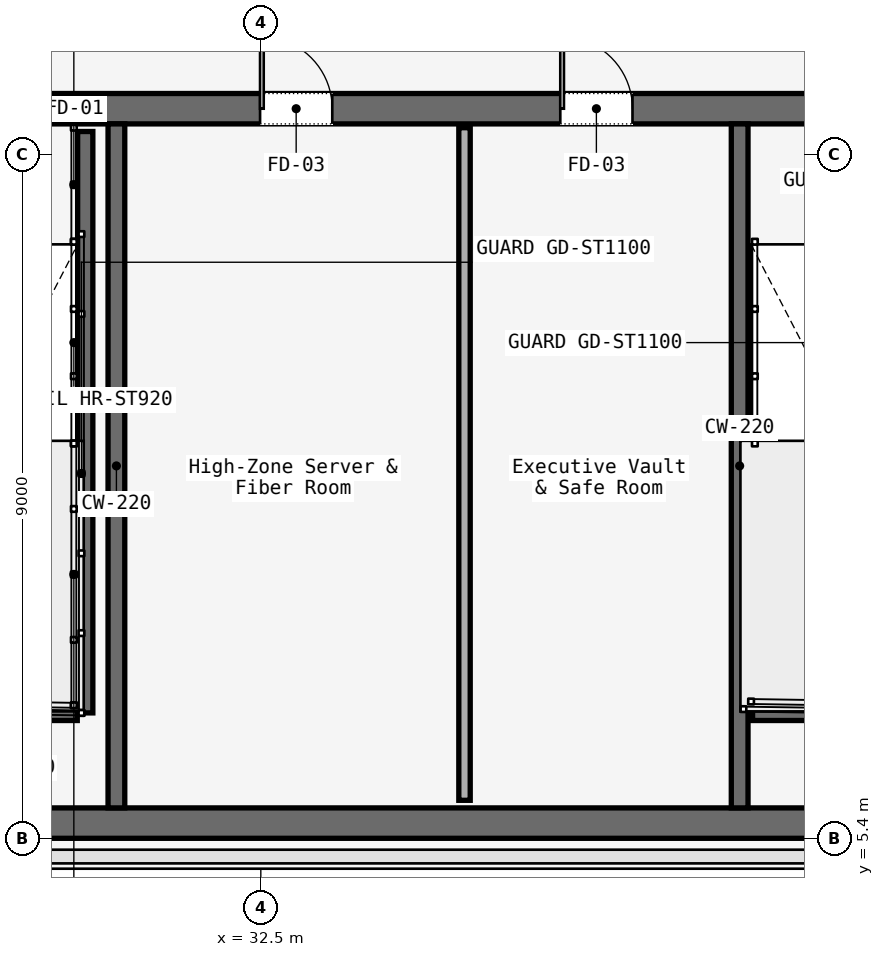
"""IFC4 building model, lengths in metres.
Left out: names, types, materials, properties, quantities, classifications, styles, units other than length and angle.
Written with IfcOpenShell. Run it as: python <this file> out.ifc"""

import sys

from ifc_helpers import new_model, si_unit, direction, frame, frame_2d, origin, place, context, subcontext, project, spatial, rectangle, extrude, element, fill, save


model = new_model("IFC4")
c1 = context("Model", 3, precision=1e-05, world=origin(), true_north=direction((0.0, 1.0)))
c2 = subcontext(c1, "Body", "Model", "MODEL_VIEW")
j1 = project(units=[si_unit("LENGTHUNIT", "METRE"), si_unit("PLANEANGLEUNIT", "RADIAN")], contexts=[c1])
p1 = place(None, origin())
s1 = spatial("IfcSite", under=j1, at=p1, CompositionType="ELEMENT")
p2 = place(p1, origin())
s2 = spatial("IfcBuilding", under=s1, at=p2, CompositionType="ELEMENT")
p3 = place(p2, frame((0.0, 0.0, 271.2)))
s3 = spatial("IfcBuildingStorey", under=s2, at=p3, CompositionType="ELEMENT", Elevation=271.2)
p4 = place(p3, frame((26.45, 15.0, 0.0), z_axis=(0.0, 0.0, 1.0), x_axis=(1.0, 0.0, 0.0)))
e1 = element("IfcWall", 1, at=p4, inside=s3, PredefinedType="SOLIDWALL", context=c2, shape_type="SweptSolid", body=[
    extrude(rectangle(XDim=31.1, YDim=0.4, at=frame_2d((15.55, 0.0))), origin(), (0.0, 0.0, 1.0), 3.58),
])
p5 = place(p4, frame((1.65, 0.0, 0.0)))
e2 = element("IfcOpeningElement", 2, at=p5, cuts=e1, PredefinedType="OPENING", context=c2, shape_type="SweptSolid", body=[
    extrude(rectangle(XDim=1.1, YDim=2.2, at=frame_2d((0.55, 1.1))), frame((0.0, 0.2, 0.0), z_axis=(0.0, -1.0, 0.0), x_axis=(1.0, 0.0, 0.0)), (0.0, 0.0, 1.0), 0.4),
])
p6 = place(p4, frame((13.65, 0.0, 0.0)))
e3 = element("IfcOpeningElement", 3, at=p6, cuts=e1, PredefinedType="OPENING", context=c2, shape_type="SweptSolid", body=[
    extrude(rectangle(XDim=1.1, YDim=2.2, at=frame_2d((0.55, 1.1))), frame((0.0, 0.2, 0.0), z_axis=(0.0, -1.0, 0.0), x_axis=(1.0, 0.0, 0.0)), (0.0, 0.0, 1.0), 0.4),
])
p7 = place(p4, frame((25.55, 0.0, 0.0)))
e4 = element("IfcOpeningElement", 4, at=p7, cuts=e1, PredefinedType="OPENING", context=c2, shape_type="SweptSolid", body=[
    extrude(rectangle(XDim=1.1, YDim=2.2, at=frame_2d((0.55, 1.1))), frame((0.0, 0.2, 0.0), z_axis=(0.0, -1.0, 0.0), x_axis=(1.0, 0.0, 0.0)), (0.0, 0.0, 1.0), 0.4),
])
p8 = place(p4, frame((19.35, 0.0, 0.0)))
e5 = element("IfcOpeningElement", 5, at=p8, cuts=e1, PredefinedType="OPENING", context=c2, shape_type="SweptSolid", body=[
    extrude(rectangle(XDim=1.1, YDim=2.2, at=frame_2d((0.55, 1.1))), frame((0.0, 0.2, 0.0), z_axis=(0.0, -1.0, 0.0), x_axis=(1.0, 0.0, 0.0)), (0.0, 0.0, 1.0), 0.4),
])
p9 = place(p4, frame((21.4, 0.0, 0.0)))
e6 = element("IfcOpeningElement", 6, at=p9, cuts=e1, PredefinedType="OPENING", context=c2, shape_type="SweptSolid", body=[
    extrude(rectangle(XDim=0.9, YDim=2.1, at=frame_2d((0.45, 1.05))), frame((0.0, 0.2, 0.0), z_axis=(0.0, -1.0, 0.0), x_axis=(1.0, 0.0, 0.0)), (0.0, 0.0, 1.0), 0.4),
])
p10 = place(p4, frame((6.04, 0.0, 0.0)))
e7 = element("IfcOpeningElement", 7, at=p10, cuts=e1, PredefinedType="OPENING", context=c2, shape_type="SweptSolid", body=[
    extrude(rectangle(XDim=0.95, YDim=2.2, at=frame_2d((0.475, 1.1))), frame((0.0, 0.2, 0.0), z_axis=(0.0, -1.0, 0.0), x_axis=(1.0, 0.0, 0.0)), (0.0, 0.0, 1.0), 0.4),
])
p11 = place(p4, frame((9.99, 0.0, 0.0)))
e8 = element("IfcOpeningElement", 8, at=p11, cuts=e1, PredefinedType="OPENING", context=c2, shape_type="SweptSolid", body=[
    extrude(rectangle(XDim=0.95, YDim=2.2, at=frame_2d((0.475, 1.1))), frame((0.0, 0.2, 0.0), z_axis=(0.0, -1.0, 0.0), x_axis=(1.0, 0.0, 0.0)), (0.0, 0.0, 1.0), 0.4),
])
p12 = place(p4, frame((23.35, 0.0, 0.0)))
e9 = element("IfcOpeningElement", 9, at=p12, cuts=e1, PredefinedType="OPENING", context=c2, shape_type="SweptSolid", body=[
    extrude(rectangle(XDim=1.3, YDim=2.3, at=frame_2d((0.65, 1.15))), frame((0.0, 0.2, 0.0), z_axis=(0.0, -1.0, 0.0), x_axis=(1.0, 0.0, 0.0)), (0.0, 0.0, 1.0), 0.4),
])
p13 = place(p3, frame((26.45, 5.6, 0.0), z_axis=(0.0, 0.0, 1.0), x_axis=(1.0, 0.0, 0.0)))
e10 = element("IfcWall", 10, at=p13, inside=s3, PredefinedType="SOLIDWALL", context=c2, shape_type="SweptSolid", body=[
    extrude(rectangle(XDim=31.1, YDim=0.4, at=frame_2d((15.55, 0.0))), origin(), (0.0, 0.0, 1.0), 3.58),
])
for number, where, z_axis, x_axis in (
    (11, (30.6, 5.8, 0.0), (0.0, 0.0, 1.0), (0.0, 1.0, 0.0)),
    (12, (38.8, 5.8, 0.0), (0.0, 0.0, 1.0), (0.0, 1.0, 0.0)),
):
    element("IfcWall", number, at=place(p3, frame(where, z_axis=z_axis, x_axis=x_axis)), inside=s3, PredefinedType="SOLIDWALL", context=c2, shape_type="SweptSolid", body=[
        extrude(rectangle(XDim=9.0, YDim=0.22, at=frame_2d((4.5, 0.0))), origin(), (0.0, 0.0, 1.0), 3.58),
    ])
p14 = place(p3, frame((30.19, 14.7, 0.0), z_axis=(0.0, 0.0, 1.0), x_axis=(0.0, -1.0, 0.0)))
e13 = element("IfcWall", 13, at=p14, inside=s3, PredefinedType="SOLIDWALL", context=c2, shape_type="SweptSolid", body=[
    extrude(rectangle(XDim=7.65, YDim=0.2, at=frame_2d((3.825, 0.0))), origin(), (0.0, 0.0, 1.0), 3.8),
])
for number, where, z_axis, x_axis in (
    (14, (26.97, 7.05, 0.0), (0.0, 0.0, 1.0), (1.0, 0.0, 0.0)),
    (15, (38.97, 7.05, 0.0), (0.0, 0.0, 1.0), (1.0, 0.0, 0.0)),
):
    element("IfcWall", number, at=place(p3, frame(where, z_axis=z_axis, x_axis=x_axis)), inside=s3, PredefinedType="SOLIDWALL", context=c2, shape_type="SweptSolid", body=[
        extrude(rectangle(XDim=3.115, YDim=0.2, at=frame_2d((1.558, 0.0))), origin(), (0.0, 0.0, 1.0), 3.8),
    ])
p15 = place(p3, frame((35.18, 5.9, 0.0), z_axis=(0.0, 0.0, 1.0), x_axis=(0.0, 1.0, 0.0)))
e16 = element("IfcWall", 16, at=p15, inside=s3, PredefinedType="PARTITIONING", context=c2, shape_type="SweptSolid", body=[
    extrude(rectangle(XDim=8.85, YDim=0.15, at=frame_2d((4.425, 0.0))), origin(), (0.0, 0.0, 1.0), 3.01),
])
p16 = place(p10, origin())
e17 = element("IfcDoor", 17, at=p16, inside=s3, OperationType="SINGLE_SWING_LEFT", PredefinedType="DOOR", context=c2, shape_type="SweptSolid", body=[
    extrude(rectangle(XDim=0.95, YDim=2.2, at=frame_2d((0.475, 1.1))), frame((0.0, 0.025, 0.0), z_axis=(0.0, -1.0, 0.0), x_axis=(1.0, 0.0, 0.0)), (0.0, 0.0, 1.0), 0.05),
])
fill(e7, e17)
p17 = place(p11, origin())
e18 = element("IfcDoor", 18, at=p17, inside=s3, OperationType="SINGLE_SWING_RIGHT", PredefinedType="DOOR", context=c2, shape_type="SweptSolid", body=[
    extrude(rectangle(XDim=0.95, YDim=2.2, at=frame_2d((0.475, 1.1))), frame((0.0, 0.025, 0.0), z_axis=(0.0, -1.0, 0.0), x_axis=(1.0, 0.0, 0.0)), (0.0, 0.0, 1.0), 0.05),
])
fill(e8, e18)
save(model, sys.argv[1])
